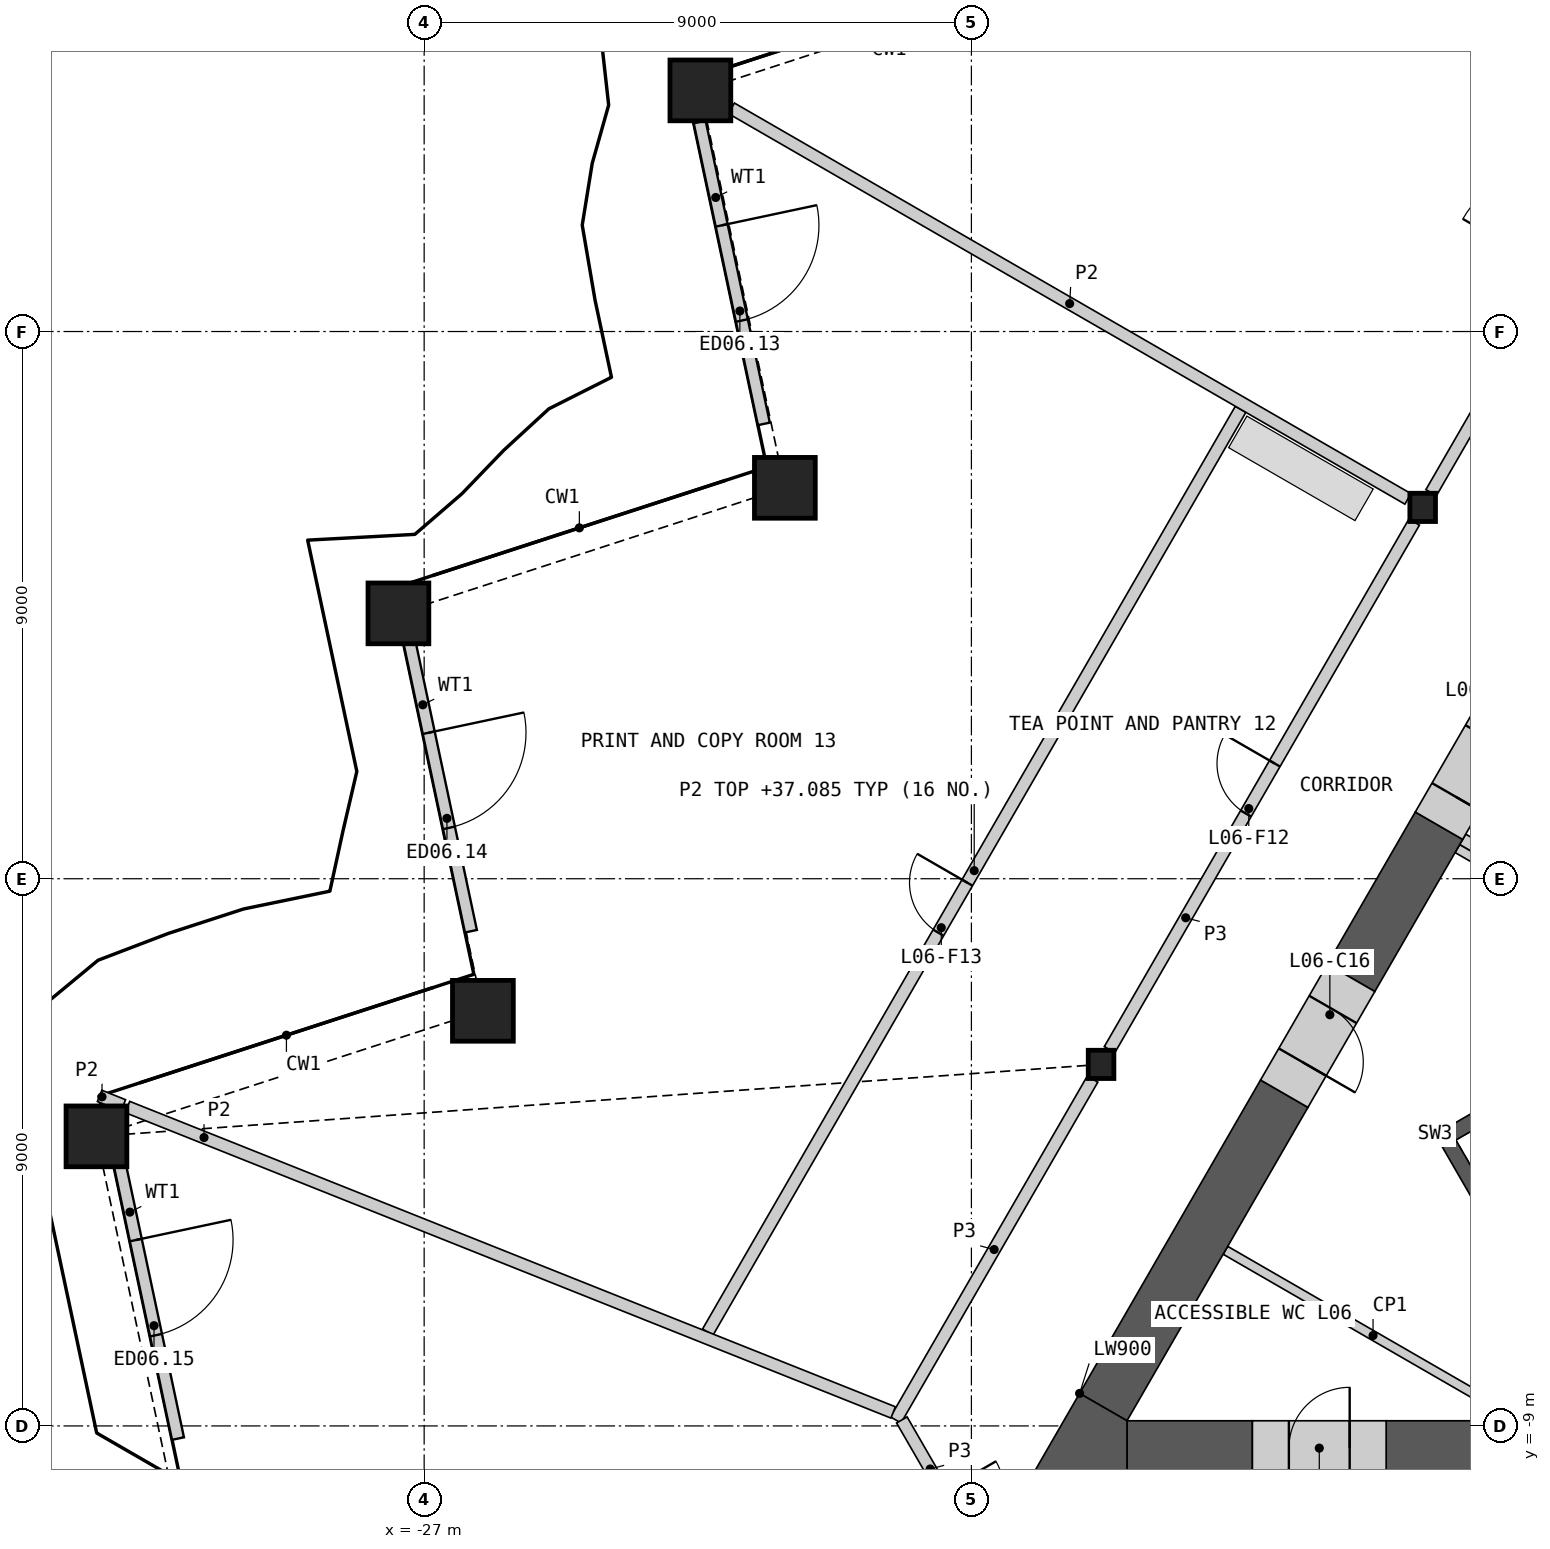
"""IFC4 building model, lengths in metres.
Left out: names, types, materials, properties, quantities, classifications, styles, units other than length and angle.
Written with IfcOpenShell. Run it as: python <this file> out.ifc"""

import sys

from ifc_helpers import new_model, si_unit, direction, frame, frame_2d, origin, origin_2d, place, context, subcontext, project, spatial, polyline, rectangle, hollow_rectangle, i_section, outline, extrude, element, fill, save


model = new_model("IFC4")
c1 = context("Model", 3, precision=1e-05, world=origin(), true_north=direction((0.0, 1.0)))
c2 = subcontext(c1, "Body", "Model", "MODEL_VIEW")
j1 = project(units=[si_unit("LENGTHUNIT", "METRE"), si_unit("PLANEANGLEUNIT", "RADIAN")], contexts=[c1])
p1 = place(None, origin())
s1 = spatial("IfcSite", under=j1, at=p1, CompositionType="ELEMENT")
p2 = place(p1, origin())
s2 = spatial("IfcBuilding", under=s1, at=p2, CompositionType="ELEMENT")
p3 = place(p2, frame((0.0, 0.0, 34.2)))
s3 = spatial("IfcBuildingStorey", under=s2, at=p3, CompositionType="ELEMENT", Elevation=34.2)
for number, where, z_axis, x_axis in (
    (1, (-22.457, 12.966, 0.0), (0.0, 0.0, 1.0), (1.0, 0.0, 0.0)),
    (2, (-21.068, 6.429, 0.0), (0.0, 0.0, 1.0), (1.0, 0.0, 0.0)),
    (3, (-27.423, 4.364, 0.0), (0.0, 0.0, 1.0), (1.0, 0.0, 0.0)),
    (4, (-26.034, -2.172, 0.0), (0.0, 0.0, 1.0), (1.0, 0.0, 0.0)),
    (5, (-32.389, -4.237, 0.0), (0.0, 0.0, 1.0), (1.0, 0.0, 0.0)),
):
    element("IfcColumn", number, at=place(p3, frame(where, z_axis=z_axis, x_axis=x_axis)), inside=s3, PredefinedType="COLUMN", context=c2, shape_type="SweptSolid", body=[
        extrude(hollow_rectangle(XDim=1.0, YDim=1.0, WallThickness=0.07, at=origin_2d()), origin(), (0.0, 0.0, 1.0), 4.2),
    ])
for number, where, z_axis, x_axis in (
    (6, (-10.578, 6.107, 0.0), (0.0, 0.0, 1.0), (1.0, 0.0, 0.0)),
    (7, (-15.868, -3.054, 0.0), (0.0, 0.0, 1.0), (1.0, 0.0, 0.0)),
):
    element("IfcColumn", number, at=place(p3, frame(where, z_axis=z_axis, x_axis=x_axis)), inside=s3, PredefinedType="COLUMN", context=c2, shape_type="SweptSolid", body=[
        extrude(i_section(OverallWidth=0.421, OverallDepth=0.465, WebThickness=0.045, FlangeThickness=0.072, at=origin_2d()), origin(), (0.0, 0.0, 1.0), 4.2),
    ])
p4 = place(p3, frame((-22.469, 12.446, 0.0), z_axis=(0.0, 0.0, 1.0), x_axis=(0.207903044531, -0.978149438519, 0.0)))
e8 = element("IfcWall", 8, at=p4, inside=s3, PredefinedType="SOLIDWALL", context=c2, shape_type="SweptSolid", body=[
    extrude(rectangle(XDim=5.076, YDim=0.2, at=frame_2d((2.538, 0.0))), origin(), (0.0, 0.0, 1.0), 3.189),
])
p5 = place(p4, frame((1.738, 0.0, 0.0)))
e9 = element("IfcOpeningElement", 9, at=p5, cuts=e8, PredefinedType="OPENING", context=c2, shape_type="SweptSolid", body=[
    extrude(rectangle(XDim=1.6, YDim=2.4, at=frame_2d((0.8, 1.2))), frame((0.0, 0.11, 0.0), z_axis=(0.0, -1.0, 0.0), x_axis=(1.0, 0.0, 0.0)), (0.0, 0.0, 1.0), 0.22),
])
p6 = place(p3, frame((-27.286, 4.102, 0.0), z_axis=(0.0, 0.0, 1.0), x_axis=(0.207949057422, -0.978139657471, 0.0)))
e10 = element("IfcWall", 10, at=p6, inside=s3, PredefinedType="SOLIDWALL", context=c2, shape_type="SweptSolid", body=[
    extrude(rectangle(XDim=5.077, YDim=0.2, at=frame_2d((2.538, 0.0))), origin(), (0.0, 0.0, 1.0), 3.189),
])
p7 = place(p6, frame((1.738, 0.0, 0.0)))
e11 = element("IfcOpeningElement", 11, at=p7, cuts=e10, PredefinedType="OPENING", context=c2, shape_type="SweptSolid", body=[
    extrude(rectangle(XDim=1.6, YDim=2.4, at=frame_2d((0.8, 1.2))), frame((0.0, 0.11, 0.0), z_axis=(0.0, -1.0, 0.0), x_axis=(1.0, 0.0, 0.0)), (0.0, 0.0, 1.0), 0.22),
])
p8 = place(p3, frame((-32.104, -4.242, 0.0), z_axis=(0.0, 0.0, 1.0), x_axis=(0.207903044531, -0.978149438519, 0.0)))
e12 = element("IfcWall", 12, at=p8, inside=s3, PredefinedType="SOLIDWALL", context=c2, shape_type="SweptSolid", body=[
    extrude(rectangle(XDim=5.076, YDim=0.2, at=frame_2d((2.538, 0.0))), origin(), (0.0, 0.0, 1.0), 3.189),
])
p9 = place(p8, frame((1.738, 0.0, 0.0)))
e13 = element("IfcOpeningElement", 13, at=p9, cuts=e12, PredefinedType="OPENING", context=c2, shape_type="SweptSolid", body=[
    extrude(rectangle(XDim=1.6, YDim=2.4, at=frame_2d((0.8, 1.2))), frame((0.0, 0.11, 0.0), z_axis=(0.0, -1.0, 0.0), x_axis=(1.0, 0.0, 0.0)), (0.0, 0.0, 1.0), 0.22),
])
p10 = place(p3, frame((-8.181, -0.357, 0.0), z_axis=(0.0, 0.0, 1.0), x_axis=(-0.866035824272, 0.499981950752, 0.0)))
e14 = element("IfcWall", 14, at=p10, inside=s3, PredefinedType="SHEAR", context=c2, shape_type="SweptSolid", body=[
    extrude(rectangle(XDim=2.009, YDim=0.2, at=frame_2d((1.004, 0.0))), origin(), (0.0, 0.0, 1.0), 3.8),
])
p11 = place(p3, origin())
e15 = element("IfcWall", 15, at=p11, inside=s3, PredefinedType="SHEAR", context=c2, shape_type="SweptSolid", body=[
    extrude(outline(polyline([(-5.307, -1.281), (-10.374, -4.206), (-10.032, -4.298), (-5.182, -1.498), (-5.307, -1.281)])), origin(), (0.0, 0.0, 1.0), 3.8),
])
p12 = place(p3, origin())
e16 = element("IfcWall", 16, at=p12, inside=s3, PredefinedType="SHEAR", context=c2, shape_type="SweptSolid", body=[
    extrude(outline(polyline([(-10.374, -4.206), (-8.83, -6.881), (-8.738, -6.539), (-10.032, -4.298), (-10.374, -4.206)])), origin(), (0.0, 0.0, 1.0), 3.8),
])
p13 = place(p3, frame((-8.268, -0.509, 0.0), z_axis=(0.0, 0.0, 1.0), x_axis=(-0.866035824272, 0.499981950752, 0.0)))
e17 = element("IfcWall", 17, at=p13, inside=s3, PredefinedType="PARTITIONING", context=c2, shape_type="SweptSolid", body=[
    extrude(rectangle(XDim=2.009, YDim=0.15, at=frame_2d((1.004, 0.0))), origin(), (0.0, 0.0, 1.0), 3.8),
])
p14 = place(p3, frame((-13.823, -6.111, 0.0), z_axis=(0.0, 0.0, 1.0), x_axis=(0.866026802741, -0.499997576928, 0.0)))
e18 = element("IfcWall", 18, at=p14, inside=s3, PredefinedType="PARTITIONING", context=c2, shape_type="SweptSolid", body=[
    extrude(rectangle(XDim=5.607, YDim=0.15, at=frame_2d((2.804, 0.0))), origin(), (0.0, 0.0, 1.0), 3.8),
])
p15 = place(p3, frame((-11.179, -9.365, 0.0), z_axis=(0.0, 0.0, 1.0), x_axis=(1.0, 0.0, 0.0)))
e19 = element("IfcWall", 19, at=p15, inside=s3, PredefinedType="SHEAR", context=c2, shape_type="SweptSolid", body=[
    extrude(rectangle(XDim=15.55, YDim=0.9, at=frame_2d((7.775, 0.0))), origin(), (0.0, 0.0, 1.0), 3.8),
])
p16 = place(p3, frame((-15.441, -9.365, 0.0), z_axis=(0.0, 0.0, 1.0), x_axis=(1.0, 0.0, 0.0)))
e20 = element("IfcWall", 20, at=p16, inside=s3, PredefinedType="SHEAR", context=c2, shape_type="SweptSolid", body=[
    extrude(rectangle(XDim=2.062, YDim=0.9, at=frame_2d((1.031, 0.0))), origin(), (0.0, 0.0, 1.0), 3.8),
])
p17 = place(p3, frame((-12.855, -3.536, 0.0), z_axis=(0.0, 0.0, 1.0), x_axis=(-0.499999419053, -0.866025739194, 0.0)))
e21 = element("IfcWall", 21, at=p17, inside=s3, PredefinedType="SHEAR", context=c2, shape_type="SweptSolid", body=[
    extrude(rectangle(XDim=5.952, YDim=0.9, at=frame_2d((2.976, 0.0))), origin(), (0.0, 0.0, 1.0), 3.8),
])
p18 = place(p3, frame((-10.31, 0.872, 0.0), z_axis=(0.0, 0.0, 1.0), x_axis=(-0.499946751862, -0.866056144429, 0.0)))
e22 = element("IfcWall", 22, at=p18, inside=s3, PredefinedType="SHEAR", context=c2, shape_type="SweptSolid", body=[
    extrude(rectangle(XDim=2.889, YDim=0.9, at=frame_2d((1.445, 0.0))), origin(), (0.0, 0.0, 1.0), 3.8),
])
p19 = place(p3, origin())
e23 = element("IfcWall", 23, at=p19, inside=s3, PredefinedType="SHEAR", context=c2, shape_type="SweptSolid", body=[
    extrude(outline(polyline([(-16.221, -8.465), (-15.441, -8.915), (-15.441, -9.815), (-17.0, -9.815), (-16.221, -8.465)])), origin(), (0.0, 0.0, 1.0), 3.8),
])
p20 = place(p3, frame((-13.379, -9.365, 0.0), z_axis=(0.0, 0.0, 1.0), x_axis=(1.0, 0.0, 0.0)))
e24 = element("IfcWall", 24, at=p20, inside=s3, PredefinedType="SHEAR", context=c2, shape_type="SweptSolid", body=[
    extrude(rectangle(XDim=2.2, YDim=0.9, at=frame_2d((1.1, 0.0))), origin(), (0.0, 0.0, 1.0), 3.8),
])
p21 = place(p20, frame((0.6, 0.0, 0.0)))
e25 = element("IfcOpeningElement", 25, at=p21, cuts=e24, PredefinedType="OPENING", context=c2, shape_type="SweptSolid", body=[
    extrude(rectangle(XDim=1.0, YDim=2.1, at=frame_2d((0.5, 1.05))), frame((0.0, 0.46, 0.0), z_axis=(0.0, -1.0, 0.0), x_axis=(1.0, 0.0, 0.0)), (0.0, 0.0, 1.0), 0.92),
])
p22 = place(p3, frame((-11.755, -1.63, 0.0), z_axis=(0.0, 0.0, 1.0), x_axis=(-0.50002983664, -0.866008176907, 0.0)))
e26 = element("IfcWall", 26, at=p22, inside=s3, PredefinedType="SHEAR", context=c2, shape_type="SweptSolid", body=[
    extrude(rectangle(XDim=2.2, YDim=0.9, at=frame_2d((1.1, 0.0))), origin(), (0.0, 0.0, 1.0), 3.8),
])
p23 = place(p22, frame((0.6, 0.0, 0.0)))
e27 = element("IfcOpeningElement", 27, at=p23, cuts=e26, PredefinedType="OPENING", context=c2, shape_type="SweptSolid", body=[
    extrude(rectangle(XDim=1.0, YDim=2.1, at=frame_2d((0.5, 1.05))), frame((0.0, 0.46, 0.0), z_axis=(0.0, -1.0, 0.0), x_axis=(1.0, 0.0, 0.0)), (0.0, 0.0, 1.0), 0.92),
])
p24 = place(p3, frame((-9.21, 2.777, 0.0), z_axis=(0.0, 0.0, 1.0), x_axis=(-0.500077893725, -0.86598042715, 0.0)))
e28 = element("IfcWall", 28, at=p24, inside=s3, PredefinedType="SHEAR", context=c2, shape_type="SweptSolid", body=[
    extrude(rectangle(XDim=2.2, YDim=0.9, at=frame_2d((1.1, 0.0))), origin(), (0.0, 0.0, 1.0), 3.8),
])
p25 = place(p24, frame((0.55, 0.0, 0.0)))
e29 = element("IfcOpeningElement", 29, at=p25, cuts=e28, PredefinedType="OPENING", context=c2, shape_type="SweptSolid", body=[
    extrude(rectangle(XDim=1.1, YDim=2.1, at=frame_2d((0.55, 1.05))), frame((0.0, 0.46, 0.0), z_axis=(0.0, -1.0, 0.0), x_axis=(1.0, 0.0, 0.0)), (0.0, 0.0, 1.0), 0.92),
])
p26 = place(p3, frame((-10.439, 6.35, 0.0), z_axis=(0.0, 0.0, 1.0), x_axis=(0.50001002959, 0.86601961312, 0.0)))
e30 = element("IfcWall", 30, at=p26, inside=s3, PredefinedType="PARTITIONING", context=c2, shape_type="SweptSolid", body=[
    extrude(rectangle(XDim=10.019, YDim=0.2, at=frame_2d((5.009, 0.0))), origin(), (0.0, 0.0, 1.0), 3.8),
])
p27 = place(p26, frame((4.16, 0.0, 0.0)))
e31 = element("IfcOpeningElement", 31, at=p27, cuts=e30, PredefinedType="OPENING", context=c2, shape_type="SweptSolid", body=[
    extrude(rectangle(XDim=1.8, YDim=2.1, at=frame_2d((0.9, 1.05))), frame((0.0, 0.11, 0.0), z_axis=(0.0, -1.0, 0.0), x_axis=(1.0, 0.0, 0.0)), (0.0, 0.0, 1.0), 0.22),
])
p28 = place(p3, frame((-15.728, -2.811, 0.0), z_axis=(0.0, 0.0, 1.0), x_axis=(0.49999175339, 0.866030164915, 0.0)))
e32 = element("IfcWall", 32, at=p28, inside=s3, PredefinedType="PARTITIONING", context=c2, shape_type="SweptSolid", body=[
    extrude(rectangle(XDim=10.019, YDim=0.2, at=frame_2d((5.009, 0.0))), origin(), (0.0, 0.0, 1.0), 3.8),
])
p29 = place(p28, frame((4.484, 0.0, 0.0)))
e33 = element("IfcOpeningElement", 33, at=p29, cuts=e32, PredefinedType="OPENING", context=c2, shape_type="SweptSolid", body=[
    extrude(rectangle(XDim=0.95, YDim=2.1, at=frame_2d((0.475, 1.05))), frame((0.0, 0.11, 0.0), z_axis=(0.0, -1.0, 0.0), x_axis=(1.0, 0.0, 0.0)), (0.0, 0.0, 1.0), 0.22),
])
p30 = place(p3, frame((-19.244, -8.902, 0.0), z_axis=(0.0, 0.0, 1.0), x_axis=(0.499984737558, 0.86603421538, 0.0)))
e34 = element("IfcWall", 34, at=p30, inside=s3, PredefinedType="PARTITIONING", context=c2, shape_type="SweptSolid", body=[
    extrude(rectangle(XDim=6.473, YDim=0.2, at=frame_2d((3.236, 0.0))), origin(), (0.0, 0.0, 1.0), 3.8),
])
p31 = place(p3, frame((-19.144, -8.902, 0.0), z_axis=(0.0, 0.0, 1.0), x_axis=(0.499958791762, -0.866049194065, 0.0)))
e35 = element("IfcWall", 35, at=p31, inside=s3, PredefinedType="PARTITIONING", context=c2, shape_type="SweptSolid", body=[
    extrude(rectangle(XDim=3.726, YDim=0.2, at=frame_2d((1.863, 0.0))), origin(), (0.0, 0.0, 1.0), 3.8),
])
p32 = place(p31, frame((1.363, 0.0, 0.0)))
e36 = element("IfcOpeningElement", 36, at=p32, cuts=e35, PredefinedType="OPENING", context=c2, shape_type="SweptSolid", body=[
    extrude(rectangle(XDim=1.0, YDim=2.1, at=frame_2d((0.5, 1.05))), frame((0.0, 0.11, 0.0), z_axis=(0.0, -1.0, 0.0), x_axis=(1.0, 0.0, 0.0)), (0.0, 0.0, 1.0), 0.22),
])
p33 = place(p3, frame((-22.335, -7.455, 0.0), z_axis=(0.0, 0.0, 1.0), x_axis=(0.499997414609, 0.866026896456, 0.0)))
e37 = element("IfcWall", 37, at=p33, inside=s3, PredefinedType="PARTITIONING", context=c2, shape_type="SweptSolid", body=[
    extrude(rectangle(XDim=17.524, YDim=0.2, at=frame_2d((8.762, 0.0))), origin(), (0.0, 0.0, 1.0), 2.885),
])
p34 = place(p33, frame((7.584, 0.0, 0.0)))
e38 = element("IfcOpeningElement", 38, at=p34, cuts=e37, PredefinedType="OPENING", context=c2, shape_type="SweptSolid", body=[
    extrude(rectangle(XDim=0.95, YDim=2.1, at=frame_2d((0.475, 1.05))), frame((0.0, 0.11, 0.0), z_axis=(0.0, -1.0, 0.0), x_axis=(1.0, 0.0, 0.0)), (0.0, 0.0, 1.0), 0.22),
])
p35 = place(p3, frame((-31.879, -3.754, 0.0), z_axis=(0.0, 0.0, 1.0), x_axis=(0.928821541656, -0.370527385973, 0.0)))
e39 = element("IfcWall", 39, at=p35, inside=s3, PredefinedType="PARTITIONING", context=c2, shape_type="SweptSolid", body=[
    extrude(rectangle(XDim=13.558, YDim=0.2, at=frame_2d((6.779, 0.0))), origin(), (0.0, 0.0, 1.0), 2.885),
])
p36 = place(p3, frame((-21.947, 12.671, 0.0), z_axis=(0.0, 0.0, 1.0), x_axis=(0.866026729935, -0.499997703033, 0.0)))
e40 = element("IfcWall", 40, at=p36, inside=s3, PredefinedType="PARTITIONING", context=c2, shape_type="SweptSolid", body=[
    extrude(rectangle(XDim=12.848, YDim=0.2, at=frame_2d((6.424, 0.0))), origin(), (0.0, 0.0, 1.0), 2.885),
])
p37 = place(p3, frame((-32.337, -3.572, 0.0), z_axis=(0.0, 0.0, 1.0), x_axis=(0.928757356094, -0.370688243003, 0.0)))
e41 = element("IfcWall", 41, at=p37, inside=s3, PredefinedType="PARTITIONING", context=c2, shape_type="SweptSolid", body=[
    extrude(rectangle(XDim=0.419, YDim=0.2, at=frame_2d((0.21, 0.0))), origin(), (0.0, 0.0, 1.0), 2.885),
])
p38 = place(p5, origin())
e42 = element("IfcDoor", 42, at=p38, inside=s3, OperationType="DOUBLE_DOOR_SINGLE_SWING", PredefinedType="DOOR", context=c2, shape_type="SweptSolid", body=[
    extrude(rectangle(XDim=1.6, YDim=2.4, at=frame_2d((0.8, 1.2))), frame((0.0, 0.025, 0.0), z_axis=(0.0, -1.0, 0.0), x_axis=(1.0, 0.0, 0.0)), (0.0, 0.0, 1.0), 0.05),
])
fill(e9, e42)
p39 = place(p7, origin())
e43 = element("IfcDoor", 43, at=p39, inside=s3, OperationType="DOUBLE_DOOR_SINGLE_SWING", PredefinedType="DOOR", context=c2, shape_type="SweptSolid", body=[
    extrude(rectangle(XDim=1.6, YDim=2.4, at=frame_2d((0.8, 1.2))), frame((0.0, 0.025, 0.0), z_axis=(0.0, -1.0, 0.0), x_axis=(1.0, 0.0, 0.0)), (0.0, 0.0, 1.0), 0.05),
])
fill(e11, e43)
p40 = place(p9, origin())
e44 = element("IfcDoor", 44, at=p40, inside=s3, OperationType="DOUBLE_DOOR_SINGLE_SWING", PredefinedType="DOOR", context=c2, shape_type="SweptSolid", body=[
    extrude(rectangle(XDim=1.6, YDim=2.4, at=frame_2d((0.8, 1.2))), frame((0.0, 0.025, 0.0), z_axis=(0.0, -1.0, 0.0), x_axis=(1.0, 0.0, 0.0)), (0.0, 0.0, 1.0), 0.05),
])
fill(e13, e44)
p41 = place(p21, origin())
e45 = element("IfcDoor", 45, at=p41, inside=s3, OperationType="SINGLE_SWING_RIGHT", PredefinedType="DOOR", context=c2, shape_type="SweptSolid", body=[
    extrude(rectangle(XDim=1.0, YDim=2.1, at=frame_2d((0.5, 1.05))), frame((0.0, 0.205, 0.0), z_axis=(0.0, -1.0, 0.0), x_axis=(1.0, 0.0, 0.0)), (0.0, 0.0, 1.0), 0.05),
])
fill(e25, e45)
p42 = place(p23, origin())
e46 = element("IfcDoor", 46, at=p42, inside=s3, OperationType="SINGLE_SWING_RIGHT", PredefinedType="DOOR", context=c2, shape_type="SweptSolid", body=[
    extrude(rectangle(XDim=1.0, YDim=2.1, at=frame_2d((0.5, 1.05))), frame((0.0, 0.205, 0.0), z_axis=(0.0, -1.0, 0.0), x_axis=(1.0, 0.0, 0.0)), (0.0, 0.0, 1.0), 0.05),
])
fill(e27, e46)
p43 = place(p25, origin())
e47 = element("IfcDoor", 47, at=p43, inside=s3, OperationType="SINGLE_SWING_RIGHT", PredefinedType="DOOR", context=c2, shape_type="SweptSolid", body=[
    extrude(rectangle(XDim=1.1, YDim=2.1, at=frame_2d((0.55, 1.05))), frame((0.0, 0.205, 0.0), z_axis=(0.0, -1.0, 0.0), x_axis=(1.0, 0.0, 0.0)), (0.0, 0.0, 1.0), 0.05),
])
fill(e29, e47)
p44 = place(p29, origin())
e48 = element("IfcDoor", 48, at=p44, inside=s3, OperationType="SINGLE_SWING_RIGHT", PredefinedType="DOOR", context=c2, shape_type="SweptSolid", body=[
    extrude(rectangle(XDim=0.95, YDim=2.1, at=frame_2d((0.475, 1.05))), frame((0.0, 0.025, 0.0), z_axis=(0.0, -1.0, 0.0), x_axis=(1.0, 0.0, 0.0)), (0.0, 0.0, 1.0), 0.05),
])
fill(e33, e48)
p45 = place(p34, origin())
e49 = element("IfcDoor", 49, at=p45, inside=s3, OperationType="SINGLE_SWING_RIGHT", PredefinedType="DOOR", context=c2, shape_type="SweptSolid", body=[
    extrude(rectangle(XDim=0.95, YDim=2.1, at=frame_2d((0.475, 1.05))), frame((0.0, 0.025, 0.0), z_axis=(0.0, -1.0, 0.0), x_axis=(1.0, 0.0, 0.0)), (0.0, 0.0, 1.0), 0.05),
])
fill(e38, e49)
save(model, sys.argv[1])
